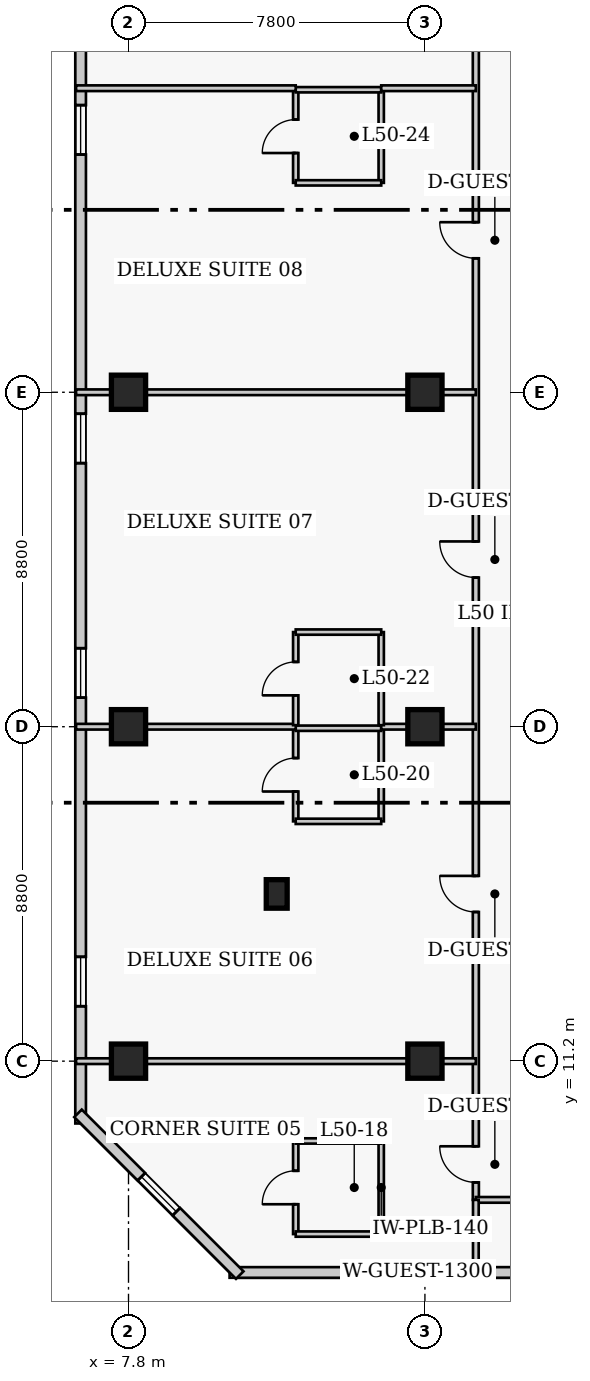
"""IFC4 building model, lengths in metres.
Left out: names, types, materials, properties, quantities, classifications, styles, units other than length and angle.
Written with IfcOpenShell. Run it as: python <this file> out.ifc"""

import sys

from ifc_helpers import new_model, si_unit, direction, frame, frame_2d, origin, origin_2d, place, context, subcontext, project, spatial, rectangle, extrude, element, fill, save


model = new_model("IFC4")
c1 = context("Model", 3, precision=1e-05, world=origin(), true_north=direction((0.0, 1.0)))
c2 = subcontext(c1, "Body", "Model", "MODEL_VIEW")
j1 = project(units=[si_unit("LENGTHUNIT", "METRE"), si_unit("PLANEANGLEUNIT", "RADIAN")], contexts=[c1])
p1 = place(None, origin())
s1 = spatial("IfcSite", under=j1, at=p1, CompositionType="ELEMENT")
p2 = place(p1, origin())
s2 = spatial("IfcBuilding", under=s1, at=p2, CompositionType="ELEMENT")
p3 = place(p2, frame((0.0, 0.0, 200.7)))
s3 = spatial("IfcBuildingStorey", under=s2, at=p3, CompositionType="ELEMENT", Elevation=200.7)
for number, where, z_axis, x_axis in (
    (1, (7.8, 11.2, 0.0), (0.0, 0.0, 1.0), (1.0, 0.0, 0.0)),
    (2, (7.8, 20.0, 0.0), (0.0, 0.0, 1.0), (1.0, 0.0, 0.0)),
    (3, (7.8, 28.8, 0.0), (0.0, 0.0, 1.0), (1.0, 0.0, 0.0)),
    (4, (15.6, 11.2, 0.0), (0.0, 0.0, 1.0), (1.0, 0.0, 0.0)),
    (5, (15.6, 20.0, 0.0), (0.0, 0.0, 1.0), (1.0, 0.0, 0.0)),
    (6, (15.6, 28.8, 0.0), (0.0, 0.0, 1.0), (1.0, 0.0, 0.0)),
):
    element("IfcColumn", number, at=place(p3, frame(where, z_axis=z_axis, x_axis=x_axis)), inside=s3, PredefinedType="COLUMN", context=c2, shape_type="SweptSolid", body=[
        extrude(rectangle(XDim=0.9, YDim=0.9, at=origin_2d()), origin(), (0.0, 0.0, 1.0), 3.9),
    ])
p4 = place(p3, frame((11.7, 15.6, 0.0), z_axis=(0.0, 0.0, 1.0), x_axis=(1.0, 0.0, 0.0)))
e7 = element("IfcColumn", 7, at=p4, inside=s3, PredefinedType="PILASTER", context=c2, shape_type="SweptSolid", body=[
    extrude(rectangle(XDim=0.55, YDim=0.75, at=origin_2d()), origin(), (0.0, 0.0, 1.0), 3.9),
])
p5 = place(p3, frame((10.46, 5.64, 0.0), z_axis=(0.0, 0.0, 1.0), x_axis=(1.0, 0.0, 0.0)))
e8 = element("IfcWall", 8, at=p5, inside=s3, PredefinedType="SOLIDWALL", context=c2, shape_type="SweptSolid", body=[
    extrude(rectangle(XDim=25.83, YDim=0.28, at=frame_2d((12.915, 0.0))), origin(), (0.0, 0.0, 1.0), 3.65),
])
p6 = place(p5, frame((16.14, 0.0, 0.0)))
e9 = element("IfcOpeningElement", 9, at=p6, cuts=e8, PredefinedType="OPENING", context=c2, shape_type="SweptSolid", body=[
    extrude(rectangle(XDim=1.4, YDim=2.15, at=frame_2d((0.7, 1.075))), frame((0.0, 0.15, 0.0), z_axis=(0.0, -1.0, 0.0), x_axis=(1.0, 0.0, 0.0)), (0.0, 0.0, 1.0), 0.3),
])
p7 = place(p5, frame((4.305, 0.0, 0.85)))
e10 = element("IfcOpeningElement", 10, at=p7, cuts=e8, PredefinedType="OPENING", context=c2, shape_type="SweptSolid", body=[
    extrude(rectangle(XDim=1.3, YDim=1.7, at=frame_2d((0.65, 0.85))), frame((0.0, 0.15, 0.0), z_axis=(0.0, -1.0, 0.0), x_axis=(1.0, 0.0, 0.0)), (0.0, 0.0, 1.0), 0.3),
])
p8 = place(p5, frame((11.115, 0.0, 0.85)))
e11 = element("IfcOpeningElement", 11, at=p8, cuts=e8, PredefinedType="OPENING", context=c2, shape_type="SweptSolid", body=[
    extrude(rectangle(XDim=1.3, YDim=1.7, at=frame_2d((0.65, 0.85))), frame((0.0, 0.15, 0.0), z_axis=(0.0, -1.0, 0.0), x_axis=(1.0, 0.0, 0.0)), (0.0, 0.0, 1.0), 0.3),
])
p9 = place(p5, frame((21.525, 0.0, 0.85)))
e12 = element("IfcOpeningElement", 12, at=p9, cuts=e8, PredefinedType="OPENING", context=c2, shape_type="SweptSolid", body=[
    extrude(rectangle(XDim=1.3, YDim=1.7, at=frame_2d((0.65, 0.85))), frame((0.0, 0.15, 0.0), z_axis=(0.0, -1.0, 0.0), x_axis=(1.0, 0.0, 0.0)), (0.0, 0.0, 1.0), 0.3),
])
p10 = place(p3, frame((6.54, 39.44, 0.0), z_axis=(0.0, 0.0, 1.0), x_axis=(0.0, -1.0, 0.0)))
e13 = element("IfcWall", 13, at=p10, inside=s3, PredefinedType="SOLIDWALL", context=c2, shape_type="SweptSolid", body=[
    extrude(rectangle(XDim=29.88, YDim=0.28, at=frame_2d((14.94, 0.0))), origin(), (0.0, 0.0, 1.0), 3.65),
])
p11 = place(p10, frame((3.085, 0.0, 0.85)))
e14 = element("IfcOpeningElement", 14, at=p11, cuts=e13, PredefinedType="OPENING", context=c2, shape_type="SweptSolid", body=[
    extrude(rectangle(XDim=1.3, YDim=1.7, at=frame_2d((0.65, 0.85))), frame((0.0, 0.15, 0.0), z_axis=(0.0, -1.0, 0.0), x_axis=(1.0, 0.0, 0.0)), (0.0, 0.0, 1.0), 0.3),
])
p12 = place(p10, frame((11.205, 0.0, 0.85)))
e15 = element("IfcOpeningElement", 15, at=p12, cuts=e13, PredefinedType="OPENING", context=c2, shape_type="SweptSolid", body=[
    extrude(rectangle(XDim=1.3, YDim=1.7, at=frame_2d((0.65, 0.85))), frame((0.0, 0.15, 0.0), z_axis=(0.0, -1.0, 0.0), x_axis=(1.0, 0.0, 0.0)), (0.0, 0.0, 1.0), 0.3),
])
p13 = place(p10, frame((17.375, 0.0, 0.85)))
e16 = element("IfcOpeningElement", 16, at=p13, cuts=e13, PredefinedType="OPENING", context=c2, shape_type="SweptSolid", body=[
    extrude(rectangle(XDim=1.3, YDim=1.7, at=frame_2d((0.65, 0.85))), frame((0.0, 0.15, 0.0), z_axis=(0.0, -1.0, 0.0), x_axis=(1.0, 0.0, 0.0)), (0.0, 0.0, 1.0), 0.3),
])
p14 = place(p10, frame((25.495, 0.0, 0.85)))
e17 = element("IfcOpeningElement", 17, at=p14, cuts=e13, PredefinedType="OPENING", context=c2, shape_type="SweptSolid", body=[
    extrude(rectangle(XDim=1.3, YDim=1.7, at=frame_2d((0.65, 0.85))), frame((0.0, 0.15, 0.0), z_axis=(0.0, -1.0, 0.0), x_axis=(1.0, 0.0, 0.0)), (0.0, 0.0, 1.0), 0.3),
])
p15 = place(p3, frame((6.471, 9.827, 0.0), z_axis=(0.0, 0.0, 1.0), x_axis=(0.707106781187, -0.707106781187, 0.0)))
e18 = element("IfcWall", 18, at=p15, inside=s3, PredefinedType="SOLIDWALL", context=c2, shape_type="SweptSolid", body=[
    extrude(rectangle(XDim=6.02, YDim=0.28, at=frame_2d((3.01, 0.0))), origin(), (0.0, 0.0, 1.0), 3.65),
])
p16 = place(p15, frame((2.36, 0.0, 0.85)))
e19 = element("IfcOpeningElement", 19, at=p16, cuts=e18, PredefinedType="OPENING", context=c2, shape_type="SweptSolid", body=[
    extrude(rectangle(XDim=1.3, YDim=1.7, at=frame_2d((0.65, 0.85))), frame((0.0, 0.15, 0.0), z_axis=(0.0, -1.0, 0.0), x_axis=(1.0, 0.0, 0.0)), (0.0, 0.0, 1.0), 0.3),
])
p17 = place(p3, frame((16.94, 7.55, 0.0), z_axis=(0.0, 0.0, 1.0), x_axis=(0.0, 1.0, 0.0)))
e20 = element("IfcWall", 20, at=p17, inside=s3, PredefinedType="PARTITIONING", context=c2, shape_type="SweptSolid", body=[
    extrude(rectangle(XDim=33.1, YDim=0.16, at=frame_2d((16.55, 0.0))), origin(), (0.0, 0.0, 1.0), 3.65),
])
p18 = place(p17, frame((0.46, 0.0, 0.0)))
e21 = element("IfcOpeningElement", 21, at=p18, cuts=e20, PredefinedType="OPENING", context=c2, shape_type="SweptSolid", body=[
    extrude(rectangle(XDim=0.95, YDim=2.1, at=frame_2d((0.475, 1.05))), frame((0.0, 0.09, 0.0), z_axis=(0.0, -1.0, 0.0), x_axis=(1.0, 0.0, 0.0)), (0.0, 0.0, 1.0), 0.18),
])
p19 = place(p17, frame((7.575, 0.0, 0.0)))
e22 = element("IfcOpeningElement", 22, at=p19, cuts=e20, PredefinedType="OPENING", context=c2, shape_type="SweptSolid", body=[
    extrude(rectangle(XDim=0.95, YDim=2.1, at=frame_2d((0.475, 1.05))), frame((0.0, 0.09, 0.0), z_axis=(0.0, -1.0, 0.0), x_axis=(1.0, 0.0, 0.0)), (0.0, 0.0, 1.0), 0.18),
])
p20 = place(p17, frame((16.375, 0.0, 0.0)))
e23 = element("IfcOpeningElement", 23, at=p20, cuts=e20, PredefinedType="OPENING", context=c2, shape_type="SweptSolid", body=[
    extrude(rectangle(XDim=0.95, YDim=2.1, at=frame_2d((0.475, 1.05))), frame((0.0, 0.09, 0.0), z_axis=(0.0, -1.0, 0.0), x_axis=(1.0, 0.0, 0.0)), (0.0, 0.0, 1.0), 0.18),
])
p21 = place(p17, frame((24.775, 0.0, 0.0)))
e24 = element("IfcOpeningElement", 24, at=p21, cuts=e20, PredefinedType="OPENING", context=c2, shape_type="SweptSolid", body=[
    extrude(rectangle(XDim=0.95, YDim=2.1, at=frame_2d((0.475, 1.05))), frame((0.0, 0.09, 0.0), z_axis=(0.0, -1.0, 0.0), x_axis=(1.0, 0.0, 0.0)), (0.0, 0.0, 1.0), 0.18),
])
p22 = place(p17, frame((31.66, 0.0, 0.0)))
e25 = element("IfcOpeningElement", 25, at=p22, cuts=e20, PredefinedType="OPENING", context=c2, shape_type="SweptSolid", body=[
    extrude(rectangle(XDim=1.0, YDim=2.15, at=frame_2d((0.5, 1.075))), frame((0.0, 0.09, 0.0), z_axis=(0.0, -1.0, 0.0), x_axis=(1.0, 0.0, 0.0)), (0.0, 0.0, 1.0), 0.18),
])
p23 = place(p3, frame((16.94, 7.55, 0.0), z_axis=(0.0, 0.0, 1.0), x_axis=(1.0, 0.0, 0.0)))
e26 = element("IfcWall", 26, at=p23, inside=s3, PredefinedType="PARTITIONING", context=c2, shape_type="SweptSolid", body=[
    extrude(rectangle(XDim=2.22, YDim=0.15, at=frame_2d((1.11, 0.0))), origin(), (0.0, 0.0, 1.0), 3.65),
])
p24 = place(p3, frame((16.94, 5.52, 0.0), z_axis=(0.0, 0.0, 1.0), x_axis=(0.0, 1.0, 0.0)))
e27 = element("IfcWall", 27, at=p24, inside=s3, PredefinedType="PARTITIONING", context=c2, shape_type="SweptSolid", body=[
    extrude(rectangle(XDim=2.03, YDim=0.15, at=frame_2d((1.015, 0.0))), origin(), (0.0, 0.0, 1.0), 3.65),
])
p25 = place(p3, frame((12.2, 6.65, 0.0), z_axis=(0.0, 0.0, 1.0), x_axis=(0.0, 1.0, 0.0)))
e28 = element("IfcWall", 28, at=p25, inside=s3, PredefinedType="PLUMBINGWALL", context=c2, shape_type="SweptSolid", body=[
    extrude(rectangle(XDim=2.45, YDim=0.14, at=frame_2d((1.225, 0.0))), origin(), (0.0, 0.0, 1.0), 3.65),
])
p26 = place(p25, frame((0.785, 0.0, 0.0)))
e29 = element("IfcOpeningElement", 29, at=p26, cuts=e28, PredefinedType="OPENING", context=c2, shape_type="SweptSolid", body=[
    extrude(rectangle(XDim=0.88, YDim=2.05, at=frame_2d((0.44, 1.025))), frame((0.0, 0.08, 0.0), z_axis=(0.0, -1.0, 0.0), x_axis=(1.0, 0.0, 0.0)), (0.0, 0.0, 1.0), 0.16),
])
p27 = place(p3, frame((14.45, 6.65, 0.0), z_axis=(0.0, 0.0, 1.0), x_axis=(0.0, 1.0, 0.0)))
e30 = element("IfcWall", 30, at=p27, inside=s3, PredefinedType="PLUMBINGWALL", context=c2, shape_type="SweptSolid", body=[
    extrude(rectangle(XDim=2.45, YDim=0.14, at=frame_2d((1.225, 0.0))), origin(), (0.0, 0.0, 1.0), 3.65),
])
for number, where, z_axis, x_axis in (
    (31, (12.2, 6.65, 0.0), (0.0, 0.0, 1.0), (1.0, 0.0, 0.0)),
    (32, (12.2, 9.1, 0.0), (0.0, 0.0, 1.0), (1.0, 0.0, 0.0)),
):
    element("IfcWall", number, at=place(p3, frame(where, z_axis=z_axis, x_axis=x_axis)), inside=s3, PredefinedType="PLUMBINGWALL", context=c2, shape_type="SweptSolid", body=[
        extrude(rectangle(XDim=2.25, YDim=0.14, at=frame_2d((1.125, 0.0))), origin(), (0.0, 0.0, 1.0), 3.65),
    ])
p28 = place(p3, frame((6.42, 11.2, 0.0), z_axis=(0.0, 0.0, 1.0), x_axis=(1.0, 0.0, 0.0)))
e33 = element("IfcWall", 33, at=p28, inside=s3, PredefinedType="PARTITIONING", context=c2, shape_type="SweptSolid", body=[
    extrude(rectangle(XDim=10.52, YDim=0.15, at=frame_2d((5.26, 0.0))), origin(), (0.0, 0.0, 1.0), 2.878),
])
p29 = place(p3, frame((12.2, 17.51, 0.0), z_axis=(0.0, 0.0, 1.0), x_axis=(0.0, 1.0, 0.0)))
e34 = element("IfcWall", 34, at=p29, inside=s3, PredefinedType="PLUMBINGWALL", context=c2, shape_type="SweptSolid", body=[
    extrude(rectangle(XDim=2.45, YDim=0.14, at=frame_2d((1.225, 0.0))), origin(), (0.0, 0.0, 1.0), 3.65),
])
p30 = place(p29, frame((0.785, 0.0, 0.0)))
e35 = element("IfcOpeningElement", 35, at=p30, cuts=e34, PredefinedType="OPENING", context=c2, shape_type="SweptSolid", body=[
    extrude(rectangle(XDim=0.88, YDim=2.05, at=frame_2d((0.44, 1.025))), frame((0.0, 0.08, 0.0), z_axis=(0.0, -1.0, 0.0), x_axis=(1.0, 0.0, 0.0)), (0.0, 0.0, 1.0), 0.16),
])
p31 = place(p3, frame((14.45, 17.51, 0.0), z_axis=(0.0, 0.0, 1.0), x_axis=(0.0, 1.0, 0.0)))
e36 = element("IfcWall", 36, at=p31, inside=s3, PredefinedType="PLUMBINGWALL", context=c2, shape_type="SweptSolid", body=[
    extrude(rectangle(XDim=2.45, YDim=0.14, at=frame_2d((1.225, 0.0))), origin(), (0.0, 0.0, 1.0), 3.65),
])
p32 = place(p3, frame((12.2, 17.51, 0.0), z_axis=(0.0, 0.0, 1.0), x_axis=(1.0, 0.0, 0.0)))
e37 = element("IfcWall", 37, at=p32, inside=s3, PredefinedType="PLUMBINGWALL", context=c2, shape_type="SweptSolid", body=[
    extrude(rectangle(XDim=2.25, YDim=0.14, at=frame_2d((1.125, 0.0))), origin(), (0.0, 0.0, 1.0), 3.65),
])
p33 = place(p3, frame((12.2, 19.96, 0.0), z_axis=(0.0, 0.0, 1.0), x_axis=(1.0, 0.0, 0.0)))
e38 = element("IfcWall", 38, at=p33, inside=s3, PredefinedType="PLUMBINGWALL", context=c2, shape_type="SweptSolid", body=[
    extrude(rectangle(XDim=2.25, YDim=0.14, at=frame_2d((1.125, 0.0))), origin(), (0.0, 0.0, 1.0), 3.038),
])
p34 = place(p3, frame((6.42, 20.0, 0.0), z_axis=(0.0, 0.0, 1.0), x_axis=(1.0, 0.0, 0.0)))
e39 = element("IfcWall", 39, at=p34, inside=s3, PredefinedType="PARTITIONING", context=c2, shape_type="SweptSolid", body=[
    extrude(rectangle(XDim=5.78, YDim=0.15, at=frame_2d((2.89, 0.0))), origin(), (0.0, 0.0, 1.0), 2.878),
])
p35 = place(p3, frame((14.45, 20.0, 0.0), z_axis=(0.0, 0.0, 1.0), x_axis=(1.0, 0.0, 0.0)))
e40 = element("IfcWall", 40, at=p35, inside=s3, PredefinedType="PARTITIONING", context=c2, shape_type="SweptSolid", body=[
    extrude(rectangle(XDim=2.49, YDim=0.15, at=frame_2d((1.245, 0.0))), origin(), (0.0, 0.0, 1.0), 2.878),
])
p36 = place(p3, frame((12.2, 20.04, 0.0), z_axis=(0.0, 0.0, 1.0), x_axis=(0.0, 1.0, 0.0)))
e41 = element("IfcWall", 41, at=p36, inside=s3, PredefinedType="PLUMBINGWALL", context=c2, shape_type="SweptSolid", body=[
    extrude(rectangle(XDim=2.45, YDim=0.14, at=frame_2d((1.225, 0.0))), origin(), (0.0, 0.0, 1.0), 3.65),
])
p37 = place(p36, frame((0.785, 0.0, 0.0)))
e42 = element("IfcOpeningElement", 42, at=p37, cuts=e41, PredefinedType="OPENING", context=c2, shape_type="SweptSolid", body=[
    extrude(rectangle(XDim=0.88, YDim=2.05, at=frame_2d((0.44, 1.025))), frame((0.0, 0.08, 0.0), z_axis=(0.0, -1.0, 0.0), x_axis=(1.0, 0.0, 0.0)), (0.0, 0.0, 1.0), 0.16),
])
p38 = place(p3, frame((14.45, 20.04, 0.0), z_axis=(0.0, 0.0, 1.0), x_axis=(0.0, 1.0, 0.0)))
e43 = element("IfcWall", 43, at=p38, inside=s3, PredefinedType="PLUMBINGWALL", context=c2, shape_type="SweptSolid", body=[
    extrude(rectangle(XDim=2.45, YDim=0.14, at=frame_2d((1.225, 0.0))), origin(), (0.0, 0.0, 1.0), 3.65),
])
p39 = place(p3, frame((12.2, 22.49, 0.0), z_axis=(0.0, 0.0, 1.0), x_axis=(1.0, 0.0, 0.0)))
e44 = element("IfcWall", 44, at=p39, inside=s3, PredefinedType="PLUMBINGWALL", context=c2, shape_type="SweptSolid", body=[
    extrude(rectangle(XDim=2.25, YDim=0.14, at=frame_2d((1.125, 0.0))), origin(), (0.0, 0.0, 1.0), 3.65),
])
p40 = place(p3, frame((6.42, 28.8, 0.0), z_axis=(0.0, 0.0, 1.0), x_axis=(1.0, 0.0, 0.0)))
e45 = element("IfcWall", 45, at=p40, inside=s3, PredefinedType="PARTITIONING", context=c2, shape_type="SweptSolid", body=[
    extrude(rectangle(XDim=10.52, YDim=0.15, at=frame_2d((5.26, 0.0))), origin(), (0.0, 0.0, 1.0), 2.878),
])
p41 = place(p3, frame((12.2, 34.31, 0.0), z_axis=(0.0, 0.0, 1.0), x_axis=(0.0, 1.0, 0.0)))
e46 = element("IfcWall", 46, at=p41, inside=s3, PredefinedType="PLUMBINGWALL", context=c2, shape_type="SweptSolid", body=[
    extrude(rectangle(XDim=2.45, YDim=0.14, at=frame_2d((1.225, 0.0))), origin(), (0.0, 0.0, 1.0), 3.65),
])
p42 = place(p41, frame((0.785, 0.0, 0.0)))
e47 = element("IfcOpeningElement", 47, at=p42, cuts=e46, PredefinedType="OPENING", context=c2, shape_type="SweptSolid", body=[
    extrude(rectangle(XDim=0.88, YDim=2.05, at=frame_2d((0.44, 1.025))), frame((0.0, 0.08, 0.0), z_axis=(0.0, -1.0, 0.0), x_axis=(1.0, 0.0, 0.0)), (0.0, 0.0, 1.0), 0.16),
])
p43 = place(p3, frame((14.45, 34.31, 0.0), z_axis=(0.0, 0.0, 1.0), x_axis=(0.0, 1.0, 0.0)))
e48 = element("IfcWall", 48, at=p43, inside=s3, PredefinedType="PLUMBINGWALL", context=c2, shape_type="SweptSolid", body=[
    extrude(rectangle(XDim=2.45, YDim=0.14, at=frame_2d((1.225, 0.0))), origin(), (0.0, 0.0, 1.0), 3.65),
])
for number, where, z_axis, x_axis in (
    (49, (12.2, 34.31, 0.0), (0.0, 0.0, 1.0), (1.0, 0.0, 0.0)),
    (50, (12.2, 36.76, 0.0), (0.0, 0.0, 1.0), (1.0, 0.0, 0.0)),
):
    element("IfcWall", number, at=place(p3, frame(where, z_axis=z_axis, x_axis=x_axis)), inside=s3, PredefinedType="PLUMBINGWALL", context=c2, shape_type="SweptSolid", body=[
        extrude(rectangle(XDim=2.25, YDim=0.14, at=frame_2d((1.125, 0.0))), origin(), (0.0, 0.0, 1.0), 3.65),
    ])
p44 = place(p3, frame((6.42, 36.8, 0.0), z_axis=(0.0, 0.0, 1.0), x_axis=(1.0, 0.0, 0.0)))
e51 = element("IfcWall", 51, at=p44, inside=s3, PredefinedType="PARTITIONING", context=c2, shape_type="SweptSolid", body=[
    extrude(rectangle(XDim=5.78, YDim=0.15, at=frame_2d((2.89, 0.0))), origin(), (0.0, 0.0, 1.0), 3.65),
])
p45 = place(p3, frame((14.45, 36.8, 0.0), z_axis=(0.0, 0.0, 1.0), x_axis=(1.0, 0.0, 0.0)))
e52 = element("IfcWall", 52, at=p45, inside=s3, PredefinedType="PARTITIONING", context=c2, shape_type="SweptSolid", body=[
    extrude(rectangle(XDim=2.49, YDim=0.15, at=frame_2d((1.245, 0.0))), origin(), (0.0, 0.0, 1.0), 3.65),
])
p46 = place(p7, origin())
e53 = element("IfcWindow", 53, at=p46, inside=s3, PartitioningType="SINGLE_PANEL", PredefinedType="WINDOW", context=c2, shape_type="SweptSolid", body=[
    extrude(rectangle(XDim=1.3, YDim=1.7, at=frame_2d((0.65, 0.85))), frame((0.0, 0.03, 0.0), z_axis=(0.0, -1.0, 0.0), x_axis=(1.0, 0.0, 0.0)), (0.0, 0.0, 1.0), 0.06),
])
fill(e10, e53)
p47 = place(p11, origin())
e54 = element("IfcWindow", 54, at=p47, inside=s3, PartitioningType="SINGLE_PANEL", PredefinedType="WINDOW", context=c2, shape_type="SweptSolid", body=[
    extrude(rectangle(XDim=1.3, YDim=1.7, at=frame_2d((0.65, 0.85))), frame((0.0, 0.03, 0.0), z_axis=(0.0, -1.0, 0.0), x_axis=(1.0, 0.0, 0.0)), (0.0, 0.0, 1.0), 0.06),
])
fill(e14, e54)
p48 = place(p12, origin())
e55 = element("IfcWindow", 55, at=p48, inside=s3, PartitioningType="SINGLE_PANEL", PredefinedType="WINDOW", context=c2, shape_type="SweptSolid", body=[
    extrude(rectangle(XDim=1.3, YDim=1.7, at=frame_2d((0.65, 0.85))), frame((0.0, 0.03, 0.0), z_axis=(0.0, -1.0, 0.0), x_axis=(1.0, 0.0, 0.0)), (0.0, 0.0, 1.0), 0.06),
])
fill(e15, e55)
p49 = place(p13, origin())
e56 = element("IfcWindow", 56, at=p49, inside=s3, PartitioningType="SINGLE_PANEL", PredefinedType="WINDOW", context=c2, shape_type="SweptSolid", body=[
    extrude(rectangle(XDim=1.3, YDim=1.7, at=frame_2d((0.65, 0.85))), frame((0.0, 0.03, 0.0), z_axis=(0.0, -1.0, 0.0), x_axis=(1.0, 0.0, 0.0)), (0.0, 0.0, 1.0), 0.06),
])
fill(e16, e56)
p50 = place(p14, origin())
e57 = element("IfcWindow", 57, at=p50, inside=s3, PartitioningType="SINGLE_PANEL", PredefinedType="WINDOW", context=c2, shape_type="SweptSolid", body=[
    extrude(rectangle(XDim=1.3, YDim=1.7, at=frame_2d((0.65, 0.85))), frame((0.0, 0.03, 0.0), z_axis=(0.0, -1.0, 0.0), x_axis=(1.0, 0.0, 0.0)), (0.0, 0.0, 1.0), 0.06),
])
fill(e17, e57)
p51 = place(p16, origin())
e58 = element("IfcWindow", 58, at=p51, inside=s3, PartitioningType="SINGLE_PANEL", PredefinedType="WINDOW", context=c2, shape_type="SweptSolid", body=[
    extrude(rectangle(XDim=1.3, YDim=1.7, at=frame_2d((0.65, 0.85))), frame((0.0, 0.03, 0.0), z_axis=(0.0, -1.0, 0.0), x_axis=(1.0, 0.0, 0.0)), (0.0, 0.0, 1.0), 0.06),
])
fill(e19, e58)
p52 = place(p26, origin())
e59 = element("IfcDoor", 59, at=p52, inside=s3, OperationType="SINGLE_SWING_LEFT", PredefinedType="DOOR", context=c2, shape_type="SweptSolid", body=[
    extrude(rectangle(XDim=0.88, YDim=2.05, at=frame_2d((0.44, 1.025))), frame((0.0, 0.025, 0.0), z_axis=(0.0, -1.0, 0.0), x_axis=(1.0, 0.0, 0.0)), (0.0, 0.0, 1.0), 0.05),
])
fill(e29, e59)
p53 = place(p18, origin())
e60 = element("IfcDoor", 60, at=p53, inside=s3, OperationType="SINGLE_SWING_RIGHT", PredefinedType="DOOR", context=c2, shape_type="SweptSolid", body=[
    extrude(rectangle(XDim=0.95, YDim=2.1, at=frame_2d((0.475, 1.05))), frame((0.0, 0.025, 0.0), z_axis=(0.0, -1.0, 0.0), x_axis=(1.0, 0.0, 0.0)), (0.0, 0.0, 1.0), 0.05),
])
fill(e21, e60)
p54 = place(p30, origin())
e61 = element("IfcDoor", 61, at=p54, inside=s3, OperationType="SINGLE_SWING_LEFT", PredefinedType="DOOR", context=c2, shape_type="SweptSolid", body=[
    extrude(rectangle(XDim=0.88, YDim=2.05, at=frame_2d((0.44, 1.025))), frame((0.0, 0.025, 0.0), z_axis=(0.0, -1.0, 0.0), x_axis=(1.0, 0.0, 0.0)), (0.0, 0.0, 1.0), 0.05),
])
fill(e35, e61)
p55 = place(p19, origin())
e62 = element("IfcDoor", 62, at=p55, inside=s3, OperationType="SINGLE_SWING_RIGHT", PredefinedType="DOOR", context=c2, shape_type="SweptSolid", body=[
    extrude(rectangle(XDim=0.95, YDim=2.1, at=frame_2d((0.475, 1.05))), frame((0.0, 0.025, 0.0), z_axis=(0.0, -1.0, 0.0), x_axis=(1.0, 0.0, 0.0)), (0.0, 0.0, 1.0), 0.05),
])
fill(e22, e62)
p56 = place(p37, origin())
e63 = element("IfcDoor", 63, at=p56, inside=s3, OperationType="SINGLE_SWING_LEFT", PredefinedType="DOOR", context=c2, shape_type="SweptSolid", body=[
    extrude(rectangle(XDim=0.88, YDim=2.05, at=frame_2d((0.44, 1.025))), frame((0.0, 0.025, 0.0), z_axis=(0.0, -1.0, 0.0), x_axis=(1.0, 0.0, 0.0)), (0.0, 0.0, 1.0), 0.05),
])
fill(e42, e63)
p57 = place(p20, origin())
e64 = element("IfcDoor", 64, at=p57, inside=s3, OperationType="SINGLE_SWING_RIGHT", PredefinedType="DOOR", context=c2, shape_type="SweptSolid", body=[
    extrude(rectangle(XDim=0.95, YDim=2.1, at=frame_2d((0.475, 1.05))), frame((0.0, 0.025, 0.0), z_axis=(0.0, -1.0, 0.0), x_axis=(1.0, 0.0, 0.0)), (0.0, 0.0, 1.0), 0.05),
])
fill(e23, e64)
p58 = place(p42, origin())
e65 = element("IfcDoor", 65, at=p58, inside=s3, OperationType="SINGLE_SWING_LEFT", PredefinedType="DOOR", context=c2, shape_type="SweptSolid", body=[
    extrude(rectangle(XDim=0.88, YDim=2.05, at=frame_2d((0.44, 1.025))), frame((0.0, 0.025, 0.0), z_axis=(0.0, -1.0, 0.0), x_axis=(1.0, 0.0, 0.0)), (0.0, 0.0, 1.0), 0.05),
])
fill(e47, e65)
p59 = place(p21, origin())
e66 = element("IfcDoor", 66, at=p59, inside=s3, OperationType="SINGLE_SWING_RIGHT", PredefinedType="DOOR", context=c2, shape_type="SweptSolid", body=[
    extrude(rectangle(XDim=0.95, YDim=2.1, at=frame_2d((0.475, 1.05))), frame((0.0, 0.025, 0.0), z_axis=(0.0, -1.0, 0.0), x_axis=(1.0, 0.0, 0.0)), (0.0, 0.0, 1.0), 0.05),
])
fill(e24, e66)
save(model, sys.argv[1])
